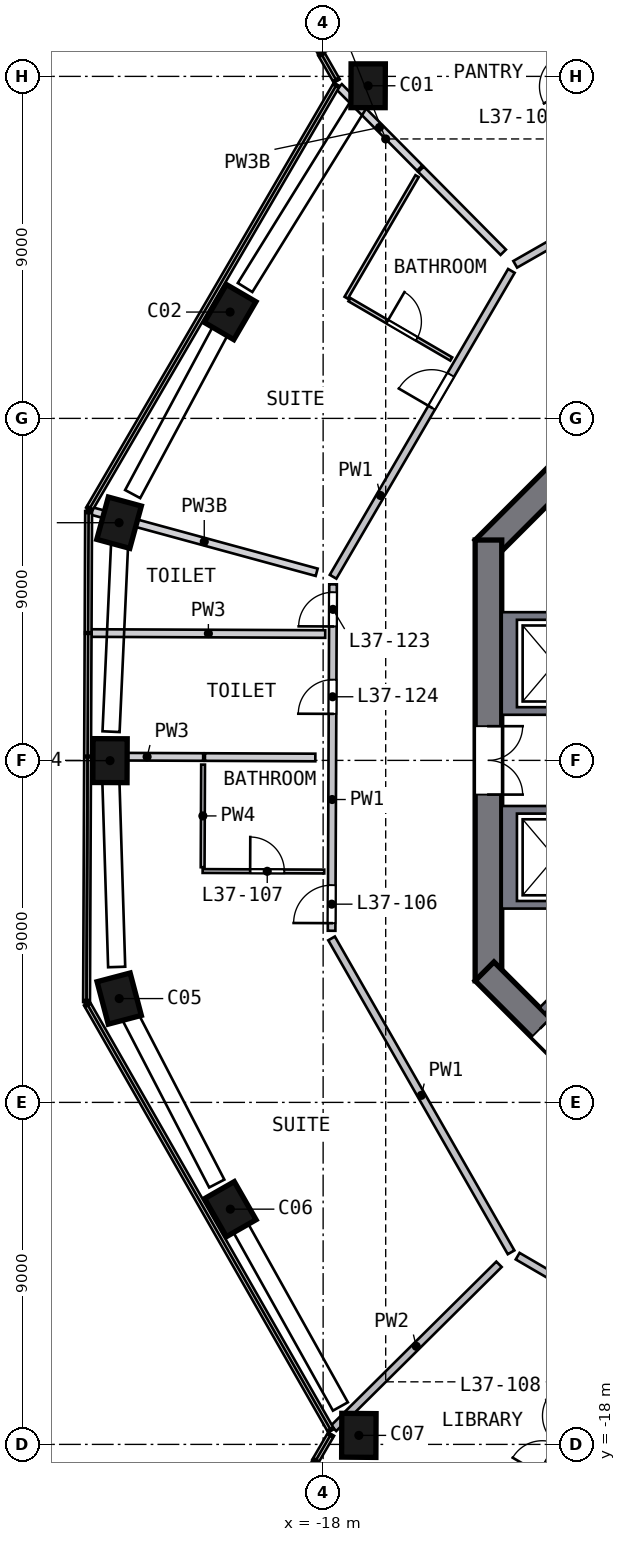
"""IFC4 building model, lengths in metres.
Left out: names, types, materials, properties, quantities, classifications, styles, units other than length and angle.
Written with IfcOpenShell. Run it as: python <this file> out.ifc"""

import sys

from ifc_helpers import new_model, si_unit, direction, frame, frame_2d, origin, origin_2d, place, context, subcontext, project, spatial, polyline, rectangle, outline, extrude, element, fill, save


model = new_model("IFC4")
c1 = context("Model", 3, precision=1e-05, world=origin(), true_north=direction((0.0, 1.0)))
c2 = subcontext(c1, "Body", "Model", "MODEL_VIEW")
j1 = project(units=[si_unit("LENGTHUNIT", "METRE"), si_unit("PLANEANGLEUNIT", "RADIAN")], contexts=[c1])
p1 = place(None, origin())
s1 = spatial("IfcSite", under=j1, at=p1, CompositionType="ELEMENT")
p2 = place(p1, origin())
s2 = spatial("IfcBuilding", under=s1, at=p2, CompositionType="ELEMENT")
p3 = place(p2, frame((0.0, 0.0, 154.0)))
s3 = spatial("IfcBuildingStorey", under=s2, at=p3, CompositionType="ELEMENT", Elevation=154.0)
p4 = place(p3, frame((-16.737, 17.829, 0.0), z_axis=(-0.065629746, -0.062612287, 0.995877722), x_axis=(0.000393045, 0.99802773, 0.062773363)))
e1 = element("IfcColumn", 1, at=p4, inside=s3, PredefinedType="COLUMN", context=c2, shape_type="SweptSolid", body=[
    extrude(rectangle(XDim=1.15, YDim=0.9, at=origin_2d()), origin(), (0.0, 0.0, 1.0), 4.207),
])
p5 = place(p3, frame((-20.396, 11.89, 0.0), z_axis=(-0.04347539, -0.075980354, 0.996161069), x_axis=(-0.502014727, -0.860417708, -0.087536174)))
e2 = element("IfcColumn", 2, at=p5, inside=s3, PredefinedType="COLUMN", context=c2, shape_type="SweptSolid", body=[
    extrude(rectangle(XDim=1.15, YDim=0.9, at=origin_2d()), origin(), (0.0, 0.0, 1.0), 4.206),
])
p6 = place(p3, frame((-23.342, 6.359, 0.0), z_axis=(-0.022865105, -0.086759726, 0.995966835), x_axis=(0.261939638, 0.960904851, 0.08971897)))
e3 = element("IfcColumn", 3, at=p6, inside=s3, PredefinedType="COLUMN", context=c2, shape_type="SweptSolid", body=[
    extrude(rectangle(XDim=1.15, YDim=0.9, at=origin_2d()), origin(), (0.0, 0.0, 1.0), 4.207),
])
p7 = place(p3, frame((-23.608, 0.099, 0.0), z_axis=(0.000348268, -0.087531282, 0.99616171), x_axis=(-0.004447239, -0.996152055, -0.087528879)))
e4 = element("IfcColumn", 4, at=p7, inside=s3, PredefinedType="COLUMN", context=c2, shape_type="SweptSolid", body=[
    extrude(rectangle(XDim=1.15, YDim=0.9, at=origin_2d()), origin(), (0.0, 0.0, 1.0), 4.206),
])
p8 = place(p3, frame((-23.394, -6.164, 0.0), z_axis=(0.023561597, -0.086527935, 0.995970766), x_axis=(-0.253551051, 0.963156374, 0.089675322)))
e5 = element("IfcColumn", 5, at=p8, inside=s3, PredefinedType="COLUMN", context=c2, shape_type="SweptSolid", body=[
    extrude(rectangle(XDim=1.15, YDim=0.9, at=origin_2d()), origin(), (0.0, 0.0, 1.0), 4.207),
])
p9 = place(p3, frame((-20.495, -11.719, 0.0), z_axis=(0.044113811, -0.075631969, 0.996159514), x_axis=(0.494611965, -0.864692618, -0.087553873)))
e6 = element("IfcColumn", 6, at=p9, inside=s3, PredefinedType="COLUMN", context=c2, shape_type="SweptSolid", body=[
    extrude(rectangle(XDim=1.15, YDim=0.9, at=origin_2d()), origin(), (0.0, 0.0, 1.0), 4.206),
])
p10 = place(p3, frame((-17.14, -17.687, 0.0), z_axis=(0.066090264, -0.063014949, 0.995821868), x_axis=(0.008616564, 0.998002686, 0.062581089)))
e7 = element("IfcColumn", 7, at=p10, inside=s3, PredefinedType="COLUMN", context=c2, shape_type="SweptSolid", body=[
    extrude(rectangle(XDim=1.15, YDim=0.9, at=origin_2d()), origin(), (0.0, 0.0, 1.0), 4.208),
])
p11 = place(p3, frame((-5.552, 13.752, 0.0), z_axis=(0.0, 0.0, 1.0), x_axis=(-0.707106781, -0.707106781, 0.0)))
e8 = element("IfcWall", 8, at=p11, inside=s3, PredefinedType="SHEAR", context=c2, shape_type="SweptSolid", body=[
    extrude(rectangle(XDim=11.598, YDim=0.7, at=frame_2d((5.799, 0.0))), origin(), (0.0, 0.0, 1.0), 4.5),
])
p12 = place(p3, frame((-13.65, 5.799, 0.0), z_axis=(0.0, 0.0, 1.0), x_axis=(0.0, -1.0, 0.0)))
e9 = element("IfcWall", 9, at=p12, inside=s3, PredefinedType="SHEAR", context=c2, shape_type="SweptSolid", body=[
    extrude(rectangle(XDim=11.598, YDim=0.7, at=frame_2d((5.799, 0.0))), origin(), (0.0, 0.0, 1.0), 4.5),
])
p13 = place(p12, frame((4.899, 0.0, 0.0)))
e10 = element("IfcOpeningElement", 10, at=p13, cuts=e9, PredefinedType="OPENING", context=c2, shape_type="SweptSolid", body=[
    extrude(rectangle(XDim=1.8, YDim=2.1, at=frame_2d((0.9, 1.05))), frame((0.0, 0.36, 0.0), z_axis=(0.0, -1.0, 0.0), x_axis=(1.0, 0.0, 0.0)), (0.0, 0.0, 1.0), 0.72),
])
p14 = place(p3, frame((-13.752, -5.552, 0.0), z_axis=(0.0, 0.0, 1.0), x_axis=(0.707106781, -0.707106781, 0.0)))
e11 = element("IfcWall", 11, at=p14, inside=s3, PredefinedType="SHEAR", context=c2, shape_type="SweptSolid", body=[
    extrude(rectangle(XDim=11.598, YDim=0.7, at=frame_2d((5.799, 0.0))), origin(), (0.0, 0.0, 1.0), 4.5),
])
p15 = place(p14, frame((2.099, 0.0, 0.0)))
e12 = element("IfcOpeningElement", 12, at=p15, cuts=e11, PredefinedType="OPENING", context=c2, shape_type="SweptSolid", body=[
    extrude(rectangle(XDim=1.2, YDim=2.1, at=frame_2d((0.6, 1.05))), frame((0.0, 0.36, 0.0), z_axis=(0.0, -1.0, 0.0), x_axis=(1.0, 0.0, 0.0)), (0.0, 0.0, 1.0), 0.72),
])
for number, where, z_axis, x_axis in (
    (13, (-16.515, 19.566, 0.0), (0.0, 0.0, 1.0), (-0.868, -0.496, 0.0)),
    (14, (-18.298, -18.483, 0.0), (0.0, 0.0, 1.0), (0.864, -0.504, 0.0)),
):
    element("IfcWall", number, at=place(p3, frame(where, z_axis=z_axis, x_axis=x_axis)), inside=s3, PredefinedType="SOLIDWALL", context=c2, shape_type="SweptSolid", body=[
        extrude(rectangle(XDim=1.875, YDim=0.15, at=frame_2d((0.938, 0.0))), origin(), (0.0, 0.0, 1.0), 4.19),
    ])
p16 = place(p3, origin())
e15 = element("IfcWall", 15, at=p16, inside=s3, PredefinedType="SOLIDWALL", context=c2, shape_type="SweptSolid", body=[
    extrude(outline(polyline([(-13.3, 3.9), (-10.9, 3.9), (-10.9, 3.7), (-12.9, 3.7), (-12.9, 1.4), (-10.9, 1.4), (-10.9, 1.2), (-13.3, 1.2), (-13.3, 3.9)])), origin(), (0.0, 0.0, 1.0), 4.19),
])
p17 = place(p3, origin())
e16 = element("IfcWall", 16, at=p17, inside=s3, PredefinedType="SOLIDWALL", context=c2, shape_type="SweptSolid", body=[
    extrude(outline(polyline([(-13.3, -3.9), (-13.3, -1.2), (-10.9, -1.2), (-10.9, -1.4), (-12.9, -1.4), (-12.9, -3.7), (-10.9, -3.7), (-10.9, -3.9), (-13.3, -3.9)])), origin(), (0.0, 0.0, 1.0), 4.19),
])
p18 = place(p3, frame((-9.334, -3.677, 0.0), z_axis=(0.0, 0.0, 1.0), x_axis=(-0.707106781, -0.707106781, 0.0)))
e17 = element("IfcWall", 17, at=p18, inside=s3, PredefinedType="SOLIDWALL", context=c2, shape_type="SweptSolid", body=[
    extrude(rectangle(XDim=4.1, YDim=0.2, at=frame_2d((2.05, 0.0))), origin(), (0.0, 0.0, 1.0), 4.19),
])
p19 = place(p3, frame((-17.777, -4.483, 0.0), z_axis=(0.0, 0.0, 1.0), x_axis=(0.004204569, 0.999991161, 0.0)))
e18 = element("IfcWall", 18, at=p19, inside=s3, PredefinedType="SOLIDWALL", context=c2, shape_type="SweptSolid", body=[
    extrude(rectangle(XDim=9.116, YDim=0.2, at=frame_2d((4.558, 0.0))), origin(), (0.0, 0.0, 1.0), 4.19),
])
p20 = place(p19, frame((0.2, 0.0, 0.0)))
e19 = element("IfcOpeningElement", 19, at=p20, cuts=e18, PredefinedType="OPENING", context=c2, shape_type="SweptSolid", body=[
    extrude(rectangle(XDim=1.0, YDim=2.1, at=frame_2d((0.5, 1.05))), frame((0.0, 0.11, 0.0), z_axis=(0.0, -1.0, 0.0), x_axis=(1.0, 0.0, 0.0)), (0.0, 0.0, 1.0), 0.22),
])
p21 = place(p19, frame((8.008, 0.0, 0.0)))
e20 = element("IfcOpeningElement", 20, at=p21, cuts=e18, PredefinedType="OPENING", context=c2, shape_type="SweptSolid", body=[
    extrude(rectangle(XDim=0.9, YDim=2.1, at=frame_2d((0.45, 1.05))), frame((0.0, 0.11, 0.0), z_axis=(0.0, -1.0, 0.0), x_axis=(1.0, 0.0, 0.0)), (0.0, 0.0, 1.0), 0.22),
])
p22 = place(p19, frame((5.708, 0.0, 0.0)))
e21 = element("IfcOpeningElement", 21, at=p22, cuts=e18, PredefinedType="OPENING", context=c2, shape_type="SweptSolid", body=[
    extrude(rectangle(XDim=0.9, YDim=2.1, at=frame_2d((0.45, 1.05))), frame((0.0, 0.11, 0.0), z_axis=(0.0, -1.0, 0.0), x_axis=(1.0, 0.0, 0.0)), (0.0, 0.0, 1.0), 0.22),
])
p23 = place(p3, frame((-17.778, -4.684, 0.0), z_axis=(0.0, 0.0, 1.0), x_axis=(0.496362719, -0.868115229, 0.0)))
e22 = element("IfcWall", 22, at=p23, inside=s3, PredefinedType="SOLIDWALL", context=c2, shape_type="SweptSolid", body=[
    extrude(rectangle(XDim=9.516, YDim=0.2, at=frame_2d((4.758, 0.0))), origin(), (0.0, 0.0, 1.0), 4.19),
])
p24 = place(p3, frame((-17.738, 4.833, 0.0), z_axis=(0.0, 0.0, 1.0), x_axis=(0.503629868, 0.863919531, 0.0)))
e23 = element("IfcWall", 23, at=p24, inside=s3, PredefinedType="SOLIDWALL", context=c2, shape_type="SweptSolid", body=[
    extrude(rectangle(XDim=9.317, YDim=0.2, at=frame_2d((4.658, 0.0))), origin(), (0.0, 0.0, 1.0), 4.19),
])
p25 = place(p24, frame((5.15, 0.0, 0.0)))
e24 = element("IfcOpeningElement", 24, at=p25, cuts=e23, PredefinedType="OPENING", context=c2, shape_type="SweptSolid", body=[
    extrude(rectangle(XDim=1.0, YDim=2.1, at=frame_2d((0.5, 1.05))), frame((0.0, 0.11, 0.0), z_axis=(0.0, -1.0, 0.0), x_axis=(1.0, 0.0, 0.0)), (0.0, 0.0, 1.0), 0.22),
])
p26 = place(p3, frame((-13.67, -21.265, 0.0), z_axis=(0.0, 0.0, 1.0), x_axis=(0.50362806, 0.863920585, 0.0)))
e25 = element("IfcWall", 25, at=p26, inside=s3, PredefinedType="SOLIDWALL", context=c2, shape_type="SweptSolid", body=[
    extrude(rectangle(XDim=7.498, YDim=0.2, at=frame_2d((3.749, 0.0))), origin(), (0.0, 0.0, 1.0), 4.19),
])
p27 = place(p26, frame((2.85, 0.0, 0.0)))
e26 = element("IfcOpeningElement", 26, at=p27, cuts=e25, PredefinedType="OPENING", context=c2, shape_type="SweptSolid", body=[
    extrude(rectangle(XDim=1.8, YDim=2.1, at=frame_2d((0.9, 1.05))), frame((0.0, 0.11, 0.0), z_axis=(0.0, -1.0, 0.0), x_axis=(1.0, 0.0, 0.0)), (0.0, 0.0, 1.0), 0.22),
])
p28 = place(p3, frame((-9.77, 14.87, 0.0), z_axis=(0.0, 0.0, 1.0), x_axis=(-0.496363285, 0.868114906, 0.0)))
e27 = element("IfcWall", 27, at=p28, inside=s3, PredefinedType="SOLIDWALL", context=c2, shape_type="SweptSolid", body=[
    extrude(rectangle(XDim=7.5, YDim=0.2, at=frame_2d((3.75, 0.0))), origin(), (0.0, 0.0, 1.0), 4.19),
])
p29 = place(p28, frame((3.3, 0.0, 0.0)))
e28 = element("IfcOpeningElement", 28, at=p29, cuts=e27, PredefinedType="OPENING", context=c2, shape_type="SweptSolid", body=[
    extrude(rectangle(XDim=0.9, YDim=2.1, at=frame_2d((0.45, 1.05))), frame((0.0, 0.11, 0.0), z_axis=(0.0, -1.0, 0.0), x_axis=(1.0, 0.0, 0.0)), (0.0, 0.0, 1.0), 0.22),
])
p30 = place(p3, frame((-12.882, -13.046, 0.0), z_axis=(0.0, 0.0, 1.0), x_axis=(0.863936482, -0.503600789, 0.0)))
e29 = element("IfcWall", 29, at=p30, inside=s3, PredefinedType="SOLIDWALL", context=c2, shape_type="SweptSolid", body=[
    extrude(rectangle(XDim=3.258, YDim=0.2, at=frame_2d((1.629, 0.0))), origin(), (0.0, 0.0, 1.0), 4.19),
])
p31 = place(p3, frame((-9.943, 14.771, 0.0), z_axis=(0.0, 0.0, 1.0), x_axis=(-0.868099733, -0.49638982, 0.0)))
e30 = element("IfcWall", 30, at=p31, inside=s3, PredefinedType="SOLIDWALL", context=c2, shape_type="SweptSolid", body=[
    extrude(rectangle(XDim=3.458, YDim=0.2, at=frame_2d((1.729, 0.0))), origin(), (0.0, 0.0, 1.0), 4.19),
])
p32 = place(p3, frame((-17.726, -17.578, 0.0), z_axis=(0.0, 0.0, 1.0), x_axis=(0.710086542, 0.70411441, 0.0)))
e31 = element("IfcWall", 31, at=p32, inside=s3, PredefinedType="SOLIDWALL", context=c2, shape_type="SweptSolid", body=[
    extrude(rectangle(XDim=6.132, YDim=0.2, at=frame_2d((3.066, 0.0))), origin(), (0.0, 0.0, 1.0), 4.19),
])
p33 = place(p3, frame((-21.17, -2.811, 0.0), z_axis=(0.0, 0.0, 1.0), x_axis=(0.004249894, 0.999990969, 0.0)))
e32 = element("IfcWall", 32, at=p33, inside=s3, PredefinedType="PARTITIONING", context=c2, shape_type="SweptSolid", body=[
    extrude(rectangle(XDim=2.7, YDim=0.1, at=frame_2d((1.35, 0.0))), origin(), (0.0, 0.0, 1.0), 4.19),
])
p34 = place(p3, frame((-21.171, -2.911, 0.0), z_axis=(0.0, 0.0, 1.0), x_axis=(0.999991196, -0.004196194, 0.0)))
e33 = element("IfcWall", 33, at=p34, inside=s3, PredefinedType="PARTITIONING", context=c2, shape_type="SweptSolid", body=[
    extrude(rectangle(XDim=3.2, YDim=0.1, at=frame_2d((1.6, 0.0))), origin(), (0.0, 0.0, 1.0), 4.19),
])
p35 = place(p34, frame((1.25, 0.0, 0.0)))
e34 = element("IfcOpeningElement", 34, at=p35, cuts=e33, PredefinedType="OPENING", context=c2, shape_type="SweptSolid", body=[
    extrude(rectangle(XDim=0.9, YDim=2.1, at=frame_2d((0.45, 1.05))), frame((0.0, 0.06, 0.0), z_axis=(0.0, -1.0, 0.0), x_axis=(1.0, 0.0, 0.0)), (0.0, 0.0, 1.0), 0.12),
])
p36 = place(p3, frame((-17.394, 12.175, 0.0), z_axis=(0.0, 0.0, 1.0), x_axis=(0.503588214, 0.863943812, 0.0)))
e35 = element("IfcWall", 35, at=p36, inside=s3, PredefinedType="PARTITIONING", context=c2, shape_type="SweptSolid", body=[
    extrude(rectangle(XDim=3.704, YDim=0.1, at=frame_2d((1.852, 0.0))), origin(), (0.0, 0.0, 1.0), 4.19),
])
p37 = place(p3, frame((-17.307, 12.125, 0.0), z_axis=(0.0, 0.0, 1.0), x_axis=(0.863901706, -0.503660444, 0.0)))
e36 = element("IfcWall", 36, at=p37, inside=s3, PredefinedType="PARTITIONING", context=c2, shape_type="SweptSolid", body=[
    extrude(rectangle(XDim=3.1, YDim=0.1, at=frame_2d((1.55, 0.0))), origin(), (0.0, 0.0, 1.0), 4.19),
])
p38 = place(p37, frame((1.15, 0.0, 0.0)))
e37 = element("IfcOpeningElement", 37, at=p38, cuts=e36, PredefinedType="OPENING", context=c2, shape_type="SweptSolid", body=[
    extrude(rectangle(XDim=0.9, YDim=2.1, at=frame_2d((0.45, 1.05))), frame((0.0, 0.06, 0.0), z_axis=(0.0, -1.0, 0.0), x_axis=(1.0, 0.0, 0.0)), (0.0, 0.0, 1.0), 0.12),
])
p39 = place(p3, frame((-21.156, 0.089, 0.0), z_axis=(0.0, 0.0, 1.0), x_axis=(-0.999991106, 0.004217627, 0.0)))
e38 = element("IfcWall", 38, at=p39, inside=s3, PredefinedType="SOLIDWALL", context=c2, shape_type="SweptSolid", body=[
    extrude(rectangle(XDim=2.952, YDim=0.2, at=frame_2d((1.476, 0.0))), origin(), (0.0, 0.0, 1.0), 4.19),
])
p40 = place(p3, frame((-24.086, 6.562, 0.0), z_axis=(0.0, 0.0, 1.0), x_axis=(0.964837285, -0.26284789, 0.0)))
e39 = element("IfcWall", 39, at=p40, inside=s3, PredefinedType="SOLIDWALL", context=c2, shape_type="SweptSolid", body=[
    extrude(rectangle(XDim=6.132, YDim=0.2, at=frame_2d((3.066, 0.0))), origin(), (0.0, 0.0, 1.0), 3.69),
])
p41 = place(p3, frame((-17.945, 3.325, 0.0), z_axis=(0.0, 0.0, 1.0), x_axis=(-0.999991146, 0.004207982, 0.0)))
e40 = element("IfcWall", 40, at=p41, inside=s3, PredefinedType="SOLIDWALL", context=c2, shape_type="SweptSolid", body=[
    extrude(rectangle(XDim=6.15, YDim=0.2, at=frame_2d((3.075, 0.0))), origin(), (0.0, 0.0, 1.0), 4.19),
])
p42 = place(p3, frame((-18.205, 0.076, 0.0), z_axis=(0.0, 0.0, 1.0), x_axis=(-0.99999152, 0.004118304, 0.0)))
e41 = element("IfcWall", 41, at=p42, inside=s3, PredefinedType="SOLIDWALL", context=c2, shape_type="SweptSolid", body=[
    extrude(rectangle(XDim=2.905, YDim=0.2, at=frame_2d((1.452, 0.0))), origin(), (0.0, 0.0, 1.0), 4.19),
])
p43 = place(p3, frame((-15.458, 15.588, 0.0), z_axis=(0.0, 0.0, 1.0), x_axis=(-0.704100795, 0.710100042, 0.0)))
e42 = element("IfcWall", 42, at=p43, inside=s3, PredefinedType="SOLIDWALL", context=c2, shape_type="SweptSolid", body=[
    extrude(rectangle(XDim=3.011, YDim=0.2, at=frame_2d((1.506, 0.0))), origin(), (0.0, 0.0, 1.0), 3.69),
])
p44 = place(p3, frame((-13.26, 13.372, 0.0), z_axis=(0.0, 0.0, 1.0), x_axis=(-0.704082958, 0.710117728, 0.0)))
e43 = element("IfcWall", 43, at=p44, inside=s3, PredefinedType="SOLIDWALL", context=c2, shape_type="SweptSolid", body=[
    extrude(rectangle(XDim=3.075, YDim=0.2, at=frame_2d((1.537, 0.0))), origin(), (0.0, 0.0, 1.0), 4.19),
])
p45 = place(p13, origin())
e44 = element("IfcDoor", 44, at=p45, inside=s3, OperationType="DOUBLE_DOOR_SINGLE_SWING", PredefinedType="DOOR", context=c2, shape_type="SweptSolid", body=[
    extrude(rectangle(XDim=1.8, YDim=2.1, at=frame_2d((0.9, 1.05))), frame((0.0, 0.025, 0.0), z_axis=(0.0, -1.0, 0.0), x_axis=(1.0, 0.0, 0.0)), (0.0, 0.0, 1.0), 0.05),
])
fill(e10, e44)
p46 = place(p15, origin())
e45 = element("IfcDoor", 45, at=p46, inside=s3, OperationType="SINGLE_SWING_LEFT", PredefinedType="DOOR", context=c2, shape_type="SweptSolid", body=[
    extrude(rectangle(XDim=1.2, YDim=2.1, at=frame_2d((0.6, 1.05))), frame((0.0, 0.025, 0.0), z_axis=(0.0, -1.0, 0.0), x_axis=(1.0, 0.0, 0.0)), (0.0, 0.0, 1.0), 0.05),
])
fill(e12, e45)
p47 = place(p25, origin())
e46 = element("IfcDoor", 46, at=p47, inside=s3, OperationType="SINGLE_SWING_LEFT", PredefinedType="DOOR", context=c2, shape_type="SweptSolid", body=[
    extrude(rectangle(XDim=1.0, YDim=2.1, at=frame_2d((0.5, 1.05))), frame((0.0, 0.025, 0.0), z_axis=(0.0, -1.0, 0.0), x_axis=(1.0, 0.0, 0.0)), (0.0, 0.0, 1.0), 0.05),
])
fill(e24, e46)
p48 = place(p38, origin())
e47 = element("IfcDoor", 47, at=p48, inside=s3, OperationType="SINGLE_SWING_LEFT", PredefinedType="DOOR", context=c2, shape_type="SweptSolid", body=[
    extrude(rectangle(XDim=0.9, YDim=2.1, at=frame_2d((0.45, 1.05))), frame((0.0, 0.025, 0.0), z_axis=(0.0, -1.0, 0.0), x_axis=(1.0, 0.0, 0.0)), (0.0, 0.0, 1.0), 0.05),
])
fill(e37, e47)
p49 = place(p20, origin())
e48 = element("IfcDoor", 48, at=p49, inside=s3, OperationType="SINGLE_SWING_LEFT", PredefinedType="DOOR", context=c2, shape_type="SweptSolid", body=[
    extrude(rectangle(XDim=1.0, YDim=2.1, at=frame_2d((0.5, 1.05))), frame((0.0, 0.025, 0.0), z_axis=(0.0, -1.0, 0.0), x_axis=(1.0, 0.0, 0.0)), (0.0, 0.0, 1.0), 0.05),
])
fill(e19, e48)
p50 = place(p35, origin())
e49 = element("IfcDoor", 49, at=p50, inside=s3, OperationType="SINGLE_SWING_LEFT", PredefinedType="DOOR", context=c2, shape_type="SweptSolid", body=[
    extrude(rectangle(XDim=0.9, YDim=2.1, at=frame_2d((0.45, 1.05))), frame((0.0, 0.025, 0.0), z_axis=(0.0, -1.0, 0.0), x_axis=(1.0, 0.0, 0.0)), (0.0, 0.0, 1.0), 0.05),
])
fill(e34, e49)
p51 = place(p27, origin())
e50 = element("IfcDoor", 50, at=p51, inside=s3, OperationType="DOUBLE_DOOR_SINGLE_SWING", PredefinedType="DOOR", context=c2, shape_type="SweptSolid", body=[
    extrude(rectangle(XDim=1.8, YDim=2.1, at=frame_2d((0.9, 1.05))), frame((0.0, 0.025, 0.0), z_axis=(0.0, -1.0, 0.0), x_axis=(1.0, 0.0, 0.0)), (0.0, 0.0, 1.0), 0.05),
])
fill(e26, e50)
p52 = place(p21, origin())
e51 = element("IfcDoor", 51, at=p52, inside=s3, OperationType="SINGLE_SWING_LEFT", PredefinedType="DOOR", context=c2, shape_type="SweptSolid", body=[
    extrude(rectangle(XDim=0.9, YDim=2.1, at=frame_2d((0.45, 1.05))), frame((0.0, 0.025, 0.0), z_axis=(0.0, -1.0, 0.0), x_axis=(1.0, 0.0, 0.0)), (0.0, 0.0, 1.0), 0.05),
])
fill(e20, e51)
p53 = place(p22, origin())
e52 = element("IfcDoor", 52, at=p53, inside=s3, OperationType="SINGLE_SWING_LEFT", PredefinedType="DOOR", context=c2, shape_type="SweptSolid", body=[
    extrude(rectangle(XDim=0.9, YDim=2.1, at=frame_2d((0.45, 1.05))), frame((0.0, 0.025, 0.0), z_axis=(0.0, -1.0, 0.0), x_axis=(1.0, 0.0, 0.0)), (0.0, 0.0, 1.0), 0.05),
])
fill(e21, e52)
save(model, sys.argv[1])
